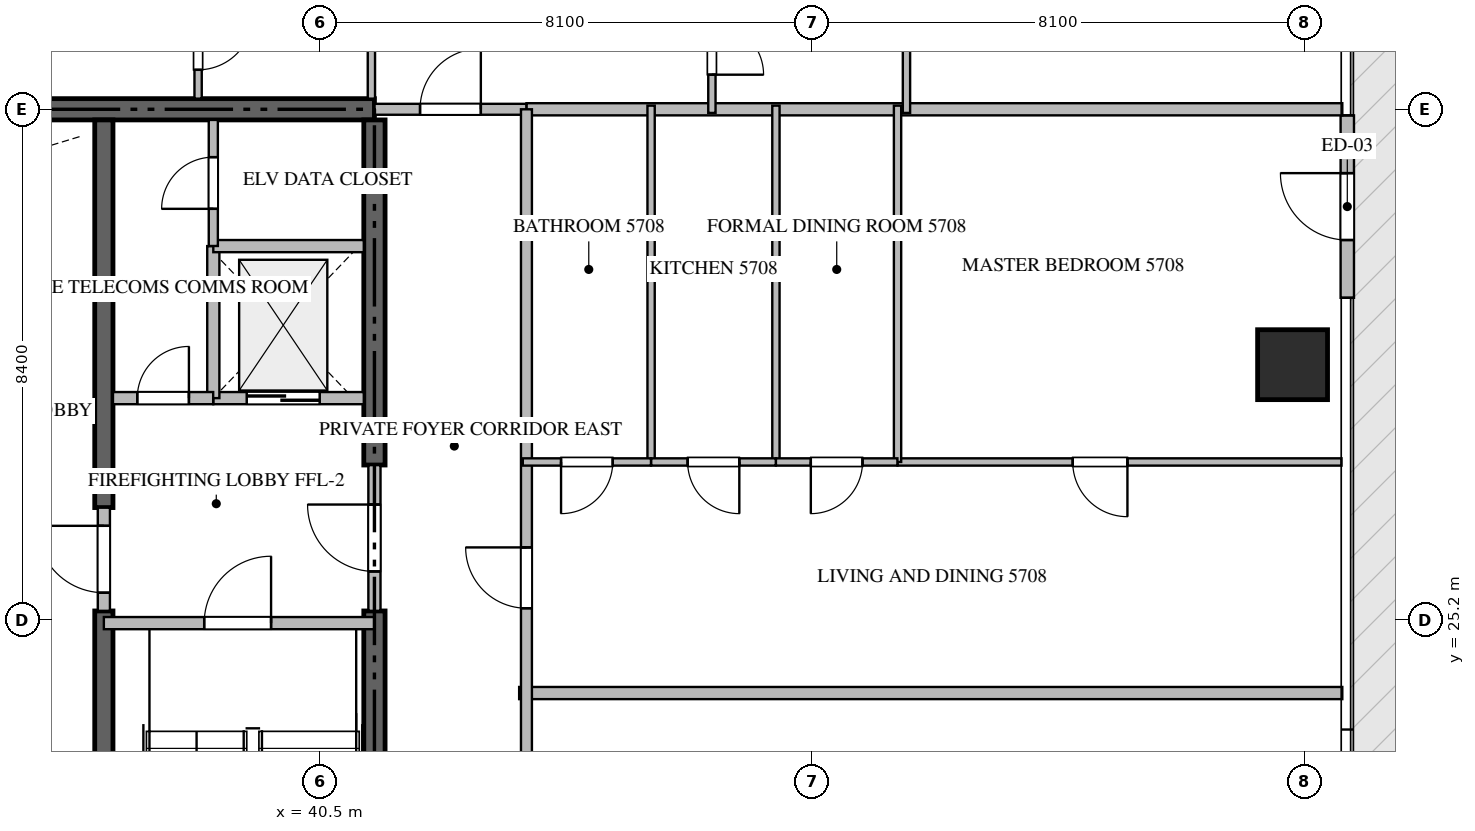
"""IFC4 building model, lengths in metres.
Left out: names, types, materials, properties, quantities, classifications, styles, units other than length and angle.
Written with IfcOpenShell. Run it as: python <this file> out.ifc"""

import sys

from ifc_helpers import new_model, si_unit, direction, frame, frame_2d, origin, origin_2d, place, context, subcontext, project, spatial, rectangle, extrude, source, transform, mapped, element, fill, save


model = new_model("IFC4")
c1 = context("Model", 3, precision=1e-05, world=origin(), true_north=direction((0.0, 1.0)))
c2 = subcontext(c1, "Body", "Model", "MODEL_VIEW")
j1 = project(units=[si_unit("LENGTHUNIT", "METRE"), si_unit("PLANEANGLEUNIT", "RADIAN")], contexts=[c1])
p1 = place(None, origin())
s1 = spatial("IfcSite", under=j1, at=p1, CompositionType="ELEMENT")
p2 = place(p1, origin())
s2 = spatial("IfcBuilding", under=s1, at=p2, CompositionType="ELEMENT")
p3 = place(p2, frame((0.0, 0.0, 229.7)))
s3 = spatial("IfcBuildingStorey", under=s2, at=p3, CompositionType="ELEMENT", Elevation=229.7)
p4 = place(p3, frame((41.4, 33.6, -0.26), z_axis=(0.0, 0.0, 1.0), x_axis=(-1.0, 0.0, 0.0)))
e1 = element("IfcWall", 1, at=p4, inside=s3, PredefinedType="SHEAR", context=c2, shape_type="SweptSolid", body=[
    extrude(rectangle(XDim=18.0, YDim=0.35, at=frame_2d((9.0, 0.0))), origin(), (0.0, 0.0, 1.0), 3.848),
])
p5 = place(p3, frame((41.4, 16.975, -0.26), z_axis=(0.0, 0.0, 1.0), x_axis=(0.0, 1.0, 0.0)))
e2 = element("IfcWall", 2, at=p5, inside=s3, PredefinedType="SHEAR", context=c2, shape_type="SweptSolid", body=[
    extrude(rectangle(XDim=8.375, YDim=0.35, at=frame_2d((4.188, 0.0))), origin(), (0.0, 0.0, 1.0), 3.848),
])
p6 = place(p3, frame((41.4, 27.75, -0.26), z_axis=(0.0, 0.0, 1.0), x_axis=(0.0, 1.0, 0.0)))
e3 = element("IfcWall", 3, at=p6, inside=s3, PredefinedType="SHEAR", context=c2, shape_type="SweptSolid", body=[
    extrude(rectangle(XDim=5.675, YDim=0.35, at=frame_2d((2.837, 0.0))), origin(), (0.0, 0.0, 1.0), 3.848),
])
p7 = place(p3, frame((36.95, 16.975, -0.26), z_axis=(0.0, 0.0, 1.0), x_axis=(0.0, 1.0, 0.0)))
e4 = element("IfcWall", 4, at=p7, inside=s3, PredefinedType="SHEAR", context=c2, shape_type="SweptSolid", body=[
    extrude(rectangle(XDim=8.375, YDim=0.3, at=frame_2d((4.188, 0.0))), origin(), (0.0, 0.0, 1.0), 3.848),
])
p8 = place(p3, frame((36.95, 27.05, -0.26), z_axis=(0.0, 0.0, 1.0), x_axis=(0.0, 1.0, 0.0)))
e5 = element("IfcWall", 5, at=p8, inside=s3, PredefinedType="SHEAR", context=c2, shape_type="SweptSolid", body=[
    extrude(rectangle(XDim=6.375, YDim=0.3, at=frame_2d((3.188, 0.0))), origin(), (0.0, 0.0, 1.0), 3.848),
])
m1 = source(origin(), c2, "Body", "SweptSolid", [
    extrude(rectangle(XDim=1.15, YDim=1.15, at=origin_2d()), origin(), (0.0, 0.0, 1.0), 3.85),
])
p9 = place(p3, frame((56.5, 29.4, -0.26), z_axis=(0.0, 0.0, 1.0), x_axis=(1.0, 0.0, 0.0)))
e6 = element("IfcColumn", 6, at=p9, inside=s3, PredefinedType="COLUMN", context=c2, shape_type="MappedRepresentation", body=[
    mapped(m1, transform((0.0, 0.0, 0.0), scale=1.0)),
])
p10 = place(p3, frame((57.4, 30.5, 0.0), z_axis=(0.0, 0.0, 1.0), x_axis=(0.0, 1.0, 0.0)))
e7 = element("IfcWall", 7, at=p10, inside=s3, PredefinedType="ELEMENTEDWALL", context=c2, shape_type="SweptSolid", body=[
    extrude(rectangle(XDim=3.0, YDim=0.22, at=frame_2d((1.5, 0.0))), origin(), (0.0, 0.0, 1.0), 3.575),
])
p11 = place(p10, frame((0.95, 0.0, 0.0)))
e8 = element("IfcOpeningElement", 8, at=p11, cuts=e7, PredefinedType="OPENING", context=c2, shape_type="SweptSolid", body=[
    extrude(rectangle(XDim=1.1, YDim=2.2, at=frame_2d((0.55, 1.1))), frame((0.0, 0.12, 0.0), z_axis=(0.0, -1.0, 0.0), x_axis=(1.0, 0.0, 0.0)), (0.0, 0.0, 1.0), 0.24),
])
p12 = place(p3, frame((36.95, 25.15, 0.0), z_axis=(0.0, 0.0, 1.0), x_axis=(1.0, 0.0, 0.0)))
e9 = element("IfcWall", 9, at=p12, inside=s3, PredefinedType="STANDARD", context=c2, shape_type="SweptSolid", body=[
    extrude(rectangle(XDim=4.45, YDim=0.2, at=frame_2d((2.225, 0.0))), origin(), (0.0, 0.0, 1.0), 3.59),
])
p13 = place(p12, frame((1.65, 0.0, 0.0)))
e10 = element("IfcOpeningElement", 10, at=p13, cuts=e9, PredefinedType="OPENING", context=c2, shape_type="SweptSolid", body=[
    extrude(rectangle(XDim=1.1, YDim=2.15, at=frame_2d((0.55, 1.075))), frame((0.0, 0.11, 0.0), z_axis=(0.0, -1.0, 0.0), x_axis=(1.0, 0.0, 0.0)), (0.0, 0.0, 1.0), 0.22),
])
p14 = place(p3, frame((38.75, 28.85, 0.0), z_axis=(0.0, 0.0, 1.0), x_axis=(1.0, 0.0, 0.0)))
e11 = element("IfcWall", 11, at=p14, inside=s3, PredefinedType="STANDARD", context=c2, shape_type="SweptSolid", body=[
    extrude(rectangle(XDim=2.475, YDim=0.2, at=frame_2d((1.238, 0.0))), origin(), (0.0, 0.0, 1.0), 3.59),
])
p15 = place(p14, frame((0.55, 0.0, 0.0)))
e12 = element("IfcOpeningElement", 12, at=p15, cuts=e11, PredefinedType="OPENING", context=c2, shape_type="SweptSolid", body=[
    extrude(rectangle(XDim=1.2, YDim=2.2, at=frame_2d((0.6, 1.1))), frame((0.0, 0.11, 0.0), z_axis=(0.0, -1.0, 0.0), x_axis=(1.0, 0.0, 0.0)), (0.0, 0.0, 1.0), 0.22),
])
p16 = place(p3, frame((35.0, 30.65, 0.0), z_axis=(0.0, 0.0, 1.0), x_axis=(1.0, 0.0, 0.0)))
e13 = element("IfcWall", 13, at=p16, inside=s3, PredefinedType="STANDARD", context=c2, shape_type="SweptSolid", body=[
    extrude(rectangle(XDim=1.8, YDim=0.2, at=frame_2d((0.9, 0.0))), origin(), (0.0, 0.0, 1.0), 3.59),
])
p17 = place(p3, frame((38.75, 28.85, 0.0), z_axis=(0.0, 0.0, 1.0), x_axis=(0.0, 1.0, 0.0)))
e14 = element("IfcWall", 14, at=p17, inside=s3, PredefinedType="STANDARD", context=c2, shape_type="SweptSolid", body=[
    extrude(rectangle(XDim=2.5, YDim=0.2, at=frame_2d((1.25, 0.0))), origin(), (0.0, 0.0, 1.0), 3.59),
])
p18 = place(p3, frame((38.75, 31.35, 0.0), z_axis=(0.0, 0.0, 1.0), x_axis=(1.0, 0.0, 0.0)))
e15 = element("IfcWall", 15, at=p18, inside=s3, PredefinedType="STANDARD", context=c2, shape_type="SweptSolid", body=[
    extrude(rectangle(XDim=2.475, YDim=0.2, at=frame_2d((1.238, 0.0))), origin(), (0.0, 0.0, 1.0), 3.59),
])
p19 = place(p3, frame((37.1, 28.85, 0.0), z_axis=(0.0, 0.0, 1.0), x_axis=(1.0, 0.0, 0.0)))
e16 = element("IfcWall", 16, at=p19, inside=s3, PredefinedType="STANDARD", context=c2, shape_type="SweptSolid", body=[
    extrude(rectangle(XDim=1.648, YDim=0.2, at=frame_2d((0.824, 0.0))), origin(), (0.0, 0.0, 1.0), 3.59),
])
p20 = place(p19, frame((0.399, 0.0, 0.0)))
e17 = element("IfcOpeningElement", 17, at=p20, cuts=e16, PredefinedType="OPENING", context=c2, shape_type="SweptSolid", body=[
    extrude(rectangle(XDim=0.85, YDim=2.1, at=frame_2d((0.425, 1.05))), frame((0.0, 0.11, 0.0), z_axis=(0.0, -1.0, 0.0), x_axis=(1.0, 0.0, 0.0)), (0.0, 0.0, 1.0), 0.22),
])
p21 = place(p3, frame((41.4, 25.352, 0.0), z_axis=(0.0, 0.0, 1.0), x_axis=(0.0, 1.0, 0.0)))
e18 = element("IfcWall", 18, at=p21, inside=s3, PredefinedType="STANDARD", context=c2, shape_type="SweptSolid", body=[
    extrude(rectangle(XDim=2.396, YDim=0.2, at=frame_2d((1.198, 0.0))), origin(), (0.0, 0.0, 1.0), 3.59),
])
p22 = place(p21, frame((0.648, 0.0, 0.0)))
e19 = element("IfcOpeningElement", 19, at=p22, cuts=e18, PredefinedType="OPENING", context=c2, shape_type="SweptSolid", body=[
    extrude(rectangle(XDim=1.1, YDim=2.15, at=frame_2d((0.55, 1.075))), frame((0.0, 0.11, 0.0), z_axis=(0.0, -1.0, 0.0), x_axis=(1.0, 0.0, 0.0)), (0.0, 0.0, 1.0), 0.22),
])
p23 = place(p3, frame((36.95, 25.352, 0.0), z_axis=(0.0, 0.0, 1.0), x_axis=(0.0, 1.0, 0.0)))
e20 = element("IfcWall", 20, at=p23, inside=s3, PredefinedType="STANDARD", context=c2, shape_type="SweptSolid", body=[
    extrude(rectangle(XDim=1.696, YDim=0.2, at=frame_2d((0.848, 0.0))), origin(), (0.0, 0.0, 1.0), 3.59),
])
p24 = place(p23, frame((0.298, 0.0, 0.0)))
e21 = element("IfcOpeningElement", 21, at=p24, cuts=e20, PredefinedType="OPENING", context=c2, shape_type="SweptSolid", body=[
    extrude(rectangle(XDim=1.1, YDim=2.15, at=frame_2d((0.55, 1.075))), frame((0.0, 0.11, 0.0), z_axis=(0.0, -1.0, 0.0), x_axis=(1.0, 0.0, 0.0)), (0.0, 0.0, 1.0), 0.22),
])
p25 = place(p3, frame((38.75, 31.352, 0.0), z_axis=(0.0, 0.0, 1.0), x_axis=(0.0, 1.0, 0.0)))
e22 = element("IfcWall", 22, at=p25, inside=s3, PredefinedType="PARTITIONING", context=c2, shape_type="SweptSolid", body=[
    extrude(rectangle(XDim=2.073, YDim=0.15, at=frame_2d((1.037, 0.0))), origin(), (0.0, 0.0, 1.0), 3.59),
])
p26 = place(p25, frame((0.611, 0.0, 0.0)))
e23 = element("IfcOpeningElement", 23, at=p26, cuts=e22, PredefinedType="OPENING", context=c2, shape_type="SweptSolid", body=[
    extrude(rectangle(XDim=0.85, YDim=2.1, at=frame_2d((0.425, 1.05))), frame((0.0, 0.085, 0.0), z_axis=(0.0, -1.0, 0.0), x_axis=(1.0, 0.0, 0.0)), (0.0, 0.0, 1.0), 0.17),
])
p27 = place(p3, frame((43.78, 24.0, 0.0), z_axis=(0.0, 0.0, 1.0), x_axis=(1.0, 0.0, 0.0)))
e24 = element("IfcWall", 24, at=p27, inside=s3, PredefinedType="PARTITIONING", context=c2, shape_type="SweptSolid", body=[
    extrude(rectangle(XDim=13.538, YDim=0.2, at=frame_2d((6.769, 0.0))), origin(), (0.0, 0.0, 1.0), 3.59),
])
p28 = place(p3, frame((43.9, 33.6, 0.0), z_axis=(0.0, 0.0, 1.0), x_axis=(1.0, 0.0, 0.0)))
e25 = element("IfcWall", 25, at=p28, inside=s3, PredefinedType="PARTITIONING", context=c2, shape_type="SweptSolid", body=[
    extrude(rectangle(XDim=13.418, YDim=0.2, at=frame_2d((6.709, 0.0))), origin(), (0.0, 0.0, 1.0), 3.59),
])
p29 = place(p3, frame((41.402, 33.6, 0.0), z_axis=(0.0, 0.0, 1.0), x_axis=(1.0, 0.0, 0.0)))
e26 = element("IfcWall", 26, at=p29, inside=s3, PredefinedType="PARTITIONING", context=c2, shape_type="SweptSolid", body=[
    extrude(rectangle(XDim=2.496, YDim=0.18, at=frame_2d((1.248, 0.0))), origin(), (0.0, 0.0, 1.0), 3.59),
])
p30 = place(p29, frame((0.748, 0.0, 0.0)))
e27 = element("IfcOpeningElement", 27, at=p30, cuts=e26, PredefinedType="OPENING", context=c2, shape_type="SweptSolid", body=[
    extrude(rectangle(XDim=1.0, YDim=2.15, at=frame_2d((0.5, 1.075))), frame((0.0, 0.1, 0.0), z_axis=(0.0, -1.0, 0.0), x_axis=(1.0, 0.0, 0.0)), (0.0, 0.0, 1.0), 0.2),
])
p31 = place(p3, frame((43.9, 16.8, 0.0), z_axis=(0.0, 0.0, 1.0), x_axis=(0.0, 1.0, 0.0)))
e28 = element("IfcWall", 28, at=p31, inside=s3, PredefinedType="PARTITIONING", context=c2, shape_type="SweptSolid", body=[
    extrude(rectangle(XDim=16.8, YDim=0.18, at=frame_2d((8.4, 0.0))), origin(), (0.0, 0.0, 1.0), 3.59),
])
p32 = place(p31, frame((4.392, 0.0, 0.0)))
e29 = element("IfcOpeningElement", 29, at=p32, cuts=e28, PredefinedType="OPENING", context=c2, shape_type="SweptSolid", body=[
    extrude(rectangle(XDim=1.0, YDim=2.15, at=frame_2d((0.5, 1.075))), frame((0.0, 0.1, 0.0), z_axis=(0.0, -1.0, 0.0), x_axis=(1.0, 0.0, 0.0)), (0.0, 0.0, 1.0), 0.2),
])
p33 = place(p31, frame((8.595, 0.0, 0.0)))
e30 = element("IfcOpeningElement", 30, at=p33, cuts=e28, PredefinedType="OPENING", context=c2, shape_type="SweptSolid", body=[
    extrude(rectangle(XDim=1.0, YDim=2.15, at=frame_2d((0.5, 1.075))), frame((0.0, 0.1, 0.0), z_axis=(0.0, -1.0, 0.0), x_axis=(1.0, 0.0, 0.0)), (0.0, 0.0, 1.0), 0.2),
])
p34 = place(p3, frame((41.35, 36.35, 0.0), z_axis=(0.0, 0.0, 1.0), x_axis=(0.0, -1.0, 0.0)))
e31 = element("IfcWall", 31, at=p34, inside=s3, PredefinedType="PARTITIONING", context=c2, shape_type="SweptSolid", body=[
    extrude(rectangle(XDim=2.575, YDim=0.12, at=frame_2d((1.288, 0.0))), origin(), (0.0, 0.0, 1.0), 3.59),
])
p35 = place(p3, frame((38.5, 35.75, 0.0), z_axis=(0.0, 0.0, 1.0), x_axis=(0.0, -1.0, 0.0)))
e32 = element("IfcWall", 32, at=p35, inside=s3, PredefinedType="PARTITIONING", context=c2, shape_type="SweptSolid", body=[
    extrude(rectangle(XDim=1.975, YDim=0.12, at=frame_2d((0.988, 0.0))), origin(), (0.0, 0.0, 1.0), 3.59),
])
p36 = place(p35, frame((0.601, 0.0, 0.0)))
e33 = element("IfcOpeningElement", 33, at=p36, cuts=e32, PredefinedType="OPENING", context=c2, shape_type="SweptSolid", body=[
    extrude(rectangle(XDim=0.9, YDim=2.1, at=frame_2d((0.45, 1.05))), frame((0.0, 0.07, 0.0), z_axis=(0.0, -1.0, 0.0), x_axis=(1.0, 0.0, 0.0)), (0.0, 0.0, 1.0), 0.14),
])
p37 = place(p3, frame((50.15, 35.65, 0.0), z_axis=(0.0, 0.0, 1.0), x_axis=(0.0, -1.0, 0.0)))
e34 = element("IfcWall", 34, at=p37, inside=s3, PredefinedType="PARTITIONING", context=c2, shape_type="SweptSolid", body=[
    extrude(rectangle(XDim=2.11, YDim=0.12, at=frame_2d((1.055, 0.0))), origin(), (0.0, 0.0, 1.0), 3.59),
])
p38 = place(p3, frame((46.95, 35.648, 0.0), z_axis=(0.0, 0.0, 1.0), x_axis=(0.0, -1.0, 0.0)))
e35 = element("IfcWall", 35, at=p38, inside=s3, PredefinedType="PARTITIONING", context=c2, shape_type="SweptSolid", body=[
    extrude(rectangle(XDim=2.108, YDim=0.12, at=frame_2d((1.054, 0.0))), origin(), (0.0, 0.0, 1.0), 3.59),
])
p39 = place(p38, frame((0.629, 0.0, 0.0)))
e36 = element("IfcOpeningElement", 36, at=p39, cuts=e35, PredefinedType="OPENING", context=c2, shape_type="SweptSolid", body=[
    extrude(rectangle(XDim=0.85, YDim=2.1, at=frame_2d((0.425, 1.05))), frame((0.0, 0.07, 0.0), z_axis=(0.0, -1.0, 0.0), x_axis=(1.0, 0.0, 0.0)), (0.0, 0.0, 1.0), 0.14),
])
p40 = place(p3, frame((57.305, 27.8, 0.0), z_axis=(0.0, 0.0, 1.0), x_axis=(-1.0, 0.0, 0.0)))
e37 = element("IfcWall", 37, at=p40, inside=s3, PredefinedType="PARTITIONING", context=c2, shape_type="SweptSolid", body=[
    extrude(rectangle(XDim=7.302, YDim=0.12, at=frame_2d((3.651, 0.0))), origin(), (0.0, 0.0, 1.0), 3.59),
])
p41 = place(p40, frame((3.521, 0.0, 0.0)))
e38 = element("IfcOpeningElement", 38, at=p41, cuts=e37, PredefinedType="OPENING", context=c2, shape_type="SweptSolid", body=[
    extrude(rectangle(XDim=0.9, YDim=2.1, at=frame_2d((0.45, 1.05))), frame((0.0, 0.07, 0.0), z_axis=(0.0, -1.0, 0.0), x_axis=(1.0, 0.0, 0.0)), (0.0, 0.0, 1.0), 0.14),
])
for number, where, z_axis, x_axis in (
    (39, (50.003, 27.8, 0.0), (0.0, 0.0, 1.0), (0.0, 1.0, 0.0)),
    (40, (48.003, 27.8, 0.0), (0.0, 0.0, 1.0), (0.0, 1.0, 0.0)),
    (41, (45.95, 27.8, 0.0), (0.0, 0.0, 1.0), (0.0, 1.0, 0.0)),
):
    element("IfcWall", number, at=place(p3, frame(where, z_axis=z_axis, x_axis=x_axis)), inside=s3, PredefinedType="PARTITIONING", context=c2, shape_type="SweptSolid", body=[
        extrude(rectangle(XDim=5.86, YDim=0.12, at=frame_2d((2.93, 0.0))), origin(), (0.0, 0.0, 1.0), 3.59),
    ])
p42 = place(p3, frame((50.001, 27.8, 0.0), z_axis=(0.0, 0.0, 1.0), x_axis=(-1.0, 0.0, 0.0)))
e42 = element("IfcWall", 42, at=p42, inside=s3, PredefinedType="PARTITIONING", context=c2, shape_type="SweptSolid", body=[
    extrude(rectangle(XDim=1.998, YDim=0.12, at=frame_2d((0.999, 0.0))), origin(), (0.0, 0.0, 1.0), 3.59),
])
p43 = place(p42, frame((0.574, 0.0, 0.0)))
e43 = element("IfcOpeningElement", 43, at=p43, cuts=e42, PredefinedType="OPENING", context=c2, shape_type="SweptSolid", body=[
    extrude(rectangle(XDim=0.85, YDim=2.1, at=frame_2d((0.425, 1.05))), frame((0.0, 0.07, 0.0), z_axis=(0.0, -1.0, 0.0), x_axis=(1.0, 0.0, 0.0)), (0.0, 0.0, 1.0), 0.14),
])
p44 = place(p3, frame((48.001, 27.8, 0.0), z_axis=(0.0, 0.0, 1.0), x_axis=(-1.0, 0.0, 0.0)))
e44 = element("IfcWall", 44, at=p44, inside=s3, PredefinedType="PARTITIONING", context=c2, shape_type="SweptSolid", body=[
    extrude(rectangle(XDim=2.051, YDim=0.12, at=frame_2d((1.025, 0.0))), origin(), (0.0, 0.0, 1.0), 3.59),
])
p45 = place(p44, frame((0.6, 0.0, 0.0)))
e45 = element("IfcOpeningElement", 45, at=p45, cuts=e44, PredefinedType="OPENING", context=c2, shape_type="SweptSolid", body=[
    extrude(rectangle(XDim=0.85, YDim=2.1, at=frame_2d((0.425, 1.05))), frame((0.0, 0.07, 0.0), z_axis=(0.0, -1.0, 0.0), x_axis=(1.0, 0.0, 0.0)), (0.0, 0.0, 1.0), 0.14),
])
p46 = place(p3, frame((45.948, 27.8, 0.0), z_axis=(0.0, 0.0, 1.0), x_axis=(-1.0, 0.0, 0.0)))
e46 = element("IfcWall", 46, at=p46, inside=s3, PredefinedType="PARTITIONING", context=c2, shape_type="SweptSolid", body=[
    extrude(rectangle(XDim=2.108, YDim=0.12, at=frame_2d((1.054, 0.0))), origin(), (0.0, 0.0, 1.0), 3.59),
])
p47 = place(p46, frame((0.629, 0.0, 0.0)))
e47 = element("IfcOpeningElement", 47, at=p47, cuts=e46, PredefinedType="OPENING", context=c2, shape_type="SweptSolid", body=[
    extrude(rectangle(XDim=0.85, YDim=2.1, at=frame_2d((0.425, 1.05))), frame((0.0, 0.07, 0.0), z_axis=(0.0, -1.0, 0.0), x_axis=(1.0, 0.0, 0.0)), (0.0, 0.0, 1.0), 0.14),
])
m2 = source(origin(), c2, "Body", "SweptSolid", [
    extrude(rectangle(XDim=1.1, YDim=2.2, at=frame_2d((0.55, 1.1))), frame((0.0, 0.025, 0.0), z_axis=(0.0, -1.0, 0.0), x_axis=(1.0, 0.0, 0.0)), (0.0, 0.0, 1.0), 0.05),
])
p48 = place(p11, origin())
e48 = element("IfcDoor", 48, at=p48, inside=s3, OperationType="SINGLE_SWING_RIGHT", PredefinedType="DOOR", context=c2, shape_type="MappedRepresentation", body=[
    mapped(m2, transform((0.0, 0.0, 0.0), scale=1.0)),
])
fill(e8, e48)
m3 = source(origin(), c2, "Body", "SweptSolid", [
    extrude(rectangle(XDim=1.1, YDim=2.15, at=frame_2d((0.55, 1.075))), frame((0.0, 0.025, 0.0), z_axis=(0.0, -1.0, 0.0), x_axis=(1.0, 0.0, 0.0)), (0.0, 0.0, 1.0), 0.05),
])
p49 = place(p13, origin())
e49 = element("IfcDoor", 49, at=p49, inside=s3, OperationType="SINGLE_SWING_RIGHT", PredefinedType="DOOR", context=c2, shape_type="MappedRepresentation", body=[
    mapped(m3, transform((0.0, 0.0, 0.0), scale=1.0)),
])
fill(e10, e49)
m4 = source(origin(), c2, "Body", "SweptSolid", [
    extrude(rectangle(XDim=1.2, YDim=2.2, at=frame_2d((0.6, 1.1))), frame((0.0, 0.025, 0.0), z_axis=(0.0, -1.0, 0.0), x_axis=(1.0, 0.0, 0.0)), (0.0, 0.0, 1.0), 0.05),
])
p50 = place(p15, origin())
e50 = element("IfcDoor", 50, at=p50, inside=s3, OperationType="DOUBLE_DOOR_SLIDING", PredefinedType="DOOR", context=c2, shape_type="MappedRepresentation", body=[
    mapped(m4, transform((0.0, 0.0, 0.0), scale=1.0)),
])
fill(e12, e50)
m5 = source(origin(), c2, "Body", "SweptSolid", [
    extrude(rectangle(XDim=0.85, YDim=2.1, at=frame_2d((0.425, 1.05))), frame((0.0, 0.025, 0.0), z_axis=(0.0, -1.0, 0.0), x_axis=(1.0, 0.0, 0.0)), (0.0, 0.0, 1.0), 0.05),
])
p51 = place(p20, origin())
e51 = element("IfcDoor", 51, at=p51, inside=s3, OperationType="SINGLE_SWING_RIGHT", PredefinedType="DOOR", context=c2, shape_type="MappedRepresentation", body=[
    mapped(m5, transform((0.0, 0.0, 0.0), scale=1.0)),
])
fill(e17, e51)
p52 = place(p22, origin())
e52 = element("IfcDoor", 52, at=p52, inside=s3, OperationType="SINGLE_SWING_RIGHT", PredefinedType="DOOR", context=c2, shape_type="MappedRepresentation", body=[
    mapped(m3, transform((0.0, 0.0, 0.0), scale=1.0)),
])
fill(e19, e52)
p53 = place(p24, origin())
e53 = element("IfcDoor", 53, at=p53, inside=s3, OperationType="SINGLE_SWING_RIGHT", PredefinedType="DOOR", context=c2, shape_type="MappedRepresentation", body=[
    mapped(m3, transform((0.0, 0.0, 0.0), scale=1.0)),
])
fill(e21, e53)
p54 = place(p26, origin())
e54 = element("IfcDoor", 54, at=p54, inside=s3, OperationType="SINGLE_SWING_LEFT", PredefinedType="DOOR", context=c2, shape_type="MappedRepresentation", body=[
    mapped(m5, transform((0.0, 0.0, 0.0), scale=1.0)),
])
fill(e23, e54)
m6 = source(origin(), c2, "Body", "SweptSolid", [
    extrude(rectangle(XDim=1.0, YDim=2.15, at=frame_2d((0.5, 1.075))), frame((0.0, 0.025, 0.0), z_axis=(0.0, -1.0, 0.0), x_axis=(1.0, 0.0, 0.0)), (0.0, 0.0, 1.0), 0.05),
])
p55 = place(p30, origin())
e55 = element("IfcDoor", 55, at=p55, inside=s3, OperationType="SINGLE_SWING_RIGHT", PredefinedType="DOOR", context=c2, shape_type="MappedRepresentation", body=[
    mapped(m6, transform((0.0, 0.0, 0.0), scale=1.0)),
])
fill(e27, e55)
p56 = place(p33, origin())
e56 = element("IfcDoor", 56, at=p56, inside=s3, OperationType="SINGLE_SWING_RIGHT", PredefinedType="DOOR", context=c2, shape_type="MappedRepresentation", body=[
    mapped(m6, transform((0.0, 0.0, 0.0), scale=1.0)),
])
fill(e30, e56)
m7 = source(origin(), c2, "Body", "SweptSolid", [
    extrude(rectangle(XDim=0.9, YDim=2.1, at=frame_2d((0.45, 1.05))), frame((0.0, 0.025, 0.0), z_axis=(0.0, -1.0, 0.0), x_axis=(1.0, 0.0, 0.0)), (0.0, 0.0, 1.0), 0.05),
])
p57 = place(p36, origin())
e57 = element("IfcDoor", 57, at=p57, inside=s3, OperationType="SINGLE_SWING_LEFT", PredefinedType="DOOR", context=c2, shape_type="MappedRepresentation", body=[
    mapped(m7, transform((0.0, 0.0, 0.0), scale=1.0)),
])
fill(e33, e57)
p58 = place(p39, origin())
e58 = element("IfcDoor", 58, at=p58, inside=s3, OperationType="SINGLE_SWING_RIGHT", PredefinedType="DOOR", context=c2, shape_type="MappedRepresentation", body=[
    mapped(m5, transform((0.0, 0.0, 0.0), scale=1.0)),
])
fill(e36, e58)
p59 = place(p41, origin())
e59 = element("IfcDoor", 59, at=p59, inside=s3, OperationType="SINGLE_SWING_LEFT", PredefinedType="DOOR", context=c2, shape_type="MappedRepresentation", body=[
    mapped(m7, transform((0.0, 0.0, 0.0), scale=1.0)),
])
fill(e38, e59)
p60 = place(p43, origin())
e60 = element("IfcDoor", 60, at=p60, inside=s3, OperationType="SINGLE_SWING_RIGHT", PredefinedType="DOOR", context=c2, shape_type="MappedRepresentation", body=[
    mapped(m5, transform((0.0, 0.0, 0.0), scale=1.0)),
])
fill(e43, e60)
p61 = place(p45, origin())
e61 = element("IfcDoor", 61, at=p61, inside=s3, OperationType="SINGLE_SWING_LEFT", PredefinedType="DOOR", context=c2, shape_type="MappedRepresentation", body=[
    mapped(m5, transform((0.0, 0.0, 0.0), scale=1.0)),
])
fill(e45, e61)
p62 = place(p47, origin())
e62 = element("IfcDoor", 62, at=p62, inside=s3, OperationType="SINGLE_SWING_RIGHT", PredefinedType="DOOR", context=c2, shape_type="MappedRepresentation", body=[
    mapped(m5, transform((0.0, 0.0, 0.0), scale=1.0)),
])
fill(e47, e62)
save(model, sys.argv[1])
